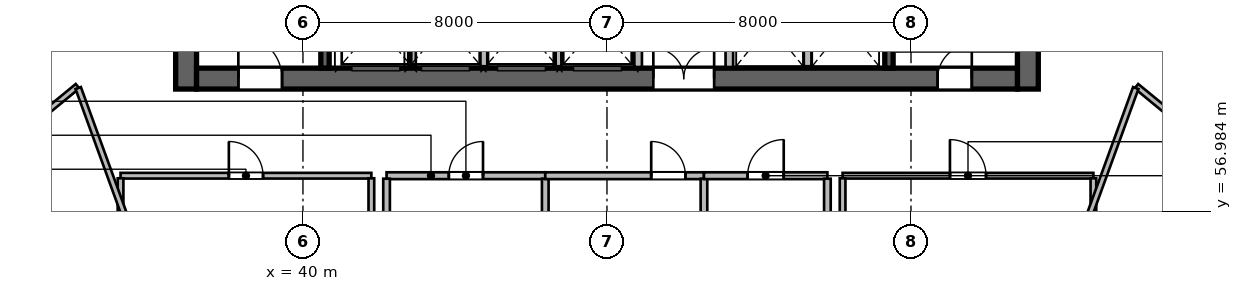
"""IFC4 building model, lengths in metres.
Left out: names, types, materials, properties, quantities, classifications, styles, units other than length and angle.
Written with IfcOpenShell. Run it as: python <this file> out.ifc"""

import sys

from ifc_helpers import new_model, si_unit, direction, frame, frame_2d, origin, place, context, subcontext, project, spatial, rectangle, extrude, source, transform, mapped, element, fill, save


model = new_model("IFC4")
c1 = context("Model", 3, precision=1e-05, world=origin(), true_north=direction((0.0, 1.0)))
c2 = subcontext(c1, "Body", "Model", "MODEL_VIEW")
j1 = project(units=[si_unit("LENGTHUNIT", "METRE"), si_unit("PLANEANGLEUNIT", "RADIAN")], contexts=[c1])
p1 = place(None, origin())
s1 = spatial("IfcSite", under=j1, at=p1, CompositionType="ELEMENT")
p2 = place(p1, origin())
s2 = spatial("IfcBuilding", under=s1, at=p2, CompositionType="ELEMENT")
p3 = place(p2, frame((0.0, 0.0, 53.4)))
s3 = spatial("IfcBuildingStorey", under=s2, at=p3, CompositionType="ELEMENT", Elevation=53.4)
m1 = source(origin(), c2, "Body", "SweptSolid", [
    extrude(rectangle(XDim=12.0, YDim=0.55, at=frame_2d((6.0, 0.0))), origin(), (0.0, 0.0, 1.0), 3.6),
])
for number, where, z_axis, x_axis in (
    (1, (36.925, 60.2, 0.0), (0.0, 0.0, 1.0), (0.0, 1.0, 0.0)),
    (2, (59.075, 60.2, 0.0), (0.0, 0.0, 1.0), (0.0, 1.0, 0.0)),
):
    element("IfcWall", number, at=place(p3, frame(where, z_axis=z_axis, x_axis=x_axis)), inside=s3, PredefinedType="SHEAR", context=c2, shape_type="MappedRepresentation", body=[
        mapped(m1, transform((0.0, 0.0, 0.0), scale=1.0)),
    ])
m2 = source(origin(), c2, "Body", "SweptSolid", [
    extrude(rectangle(XDim=21.6, YDim=0.55, at=frame_2d((10.8, 0.0))), origin(), (0.0, 0.0, 1.0), 3.6),
])
p4 = place(p3, frame((37.2, 60.475, 0.0), z_axis=(0.0, 0.0, 1.0), x_axis=(1.0, 0.0, 0.0)))
e3 = element("IfcWall", 3, at=p4, inside=s3, PredefinedType="SHEAR", context=c2, shape_type="MappedRepresentation", body=[
    mapped(m2, transform((0.0, 0.0, 0.0), scale=1.0)),
])
p5 = place(p4, frame((1.1, 0.0, 0.0)))
e4 = element("IfcOpeningElement", 4, at=p5, cuts=e3, PredefinedType="OPENING", context=c2, shape_type="SweptSolid", body=[
    extrude(rectangle(XDim=1.15, YDim=2.15, at=frame_2d((0.575, 1.075))), frame((0.0, 0.285, 0.0), z_axis=(0.0, -1.0, 0.0), x_axis=(1.0, 0.0, 0.0)), (0.0, 0.0, 1.0), 0.57),
])
p6 = place(p4, frame((19.5, 0.0, 0.0)))
e5 = element("IfcOpeningElement", 5, at=p6, cuts=e3, PredefinedType="OPENING", context=c2, shape_type="SweptSolid", body=[
    extrude(rectangle(XDim=0.9, YDim=2.1, at=frame_2d((0.45, 1.05))), frame((0.0, 0.285, 0.0), z_axis=(0.0, -1.0, 0.0), x_axis=(1.0, 0.0, 0.0)), (0.0, 0.0, 1.0), 0.57),
])
p7 = place(p4, frame((12.02, 0.0, 0.0)))
e6 = element("IfcOpeningElement", 6, at=p7, cuts=e3, PredefinedType="OPENING", context=c2, shape_type="SweptSolid", body=[
    extrude(rectangle(XDim=1.6, YDim=2.15, at=frame_2d((0.8, 1.075))), frame((0.0, 0.285, 0.0), z_axis=(0.0, -1.0, 0.0), x_axis=(1.0, 0.0, 0.0)), (0.0, 0.0, 1.0), 0.57),
])
m3 = source(origin(), c2, "Body", "SweptSolid", [
    extrude(rectangle(XDim=10.9, YDim=0.22, at=frame_2d((5.45, 0.0))), origin(), (0.0, 0.0, 1.0), 3.6),
])
p8 = place(p3, frame((40.58, 60.75, 0.0), z_axis=(0.0, 0.0, 1.0), x_axis=(0.0, 1.0, 0.0)))
e7 = element("IfcWall", 7, at=p8, inside=s3, PredefinedType="SHEAR", context=c2, shape_type="MappedRepresentation", body=[
    mapped(m3, transform((0.0, 0.0, 0.0), scale=1.0)),
])
p9 = place(p3, frame((55.42, 60.75, 0.0), z_axis=(0.0, 0.0, 1.0), x_axis=(0.0, 1.0, 0.0)))
e8 = element("IfcWall", 8, at=p9, inside=s3, PredefinedType="SHEAR", context=c2, shape_type="MappedRepresentation", body=[
    mapped(m3, transform((0.0, 0.0, 0.0), scale=1.0)),
])
p10 = place(p9, frame((9.495, 0.0, 0.0)))
e9 = element("IfcOpeningElement", 9, at=p10, cuts=e8, PredefinedType="OPENING", context=c2, shape_type="SweptSolid", body=[
    extrude(rectangle(XDim=1.15, YDim=2.15, at=frame_2d((0.575, 1.075))), frame((0.0, 0.12, 0.0), z_axis=(0.0, -1.0, 0.0), x_axis=(1.0, 0.0, 0.0)), (0.0, 0.0, 1.0), 0.24),
])
m4 = source(origin(), c2, "Body", "SweptSolid", [
    extrude(rectangle(XDim=2.24, YDim=0.2, at=frame_2d((1.12, 0.0))), origin(), (0.0, 0.0, 1.0), 3.36),
])
for number, where, z_axis, x_axis in (
    (10, (48.82, 60.78, 0.0), (0.0, 0.0, 1.0), (0.0, 1.0, 0.0)),
    (11, (51.22, 60.78, 0.0), (0.0, 0.0, 1.0), (0.0, 1.0, 0.0)),
):
    element("IfcWall", number, at=place(p3, frame(where, z_axis=z_axis, x_axis=x_axis)), inside=s3, PredefinedType="SOLIDWALL", context=c2, shape_type="MappedRepresentation", body=[
        mapped(m4, transform((0.0, 0.0, 0.0), scale=1.0)),
    ])
m5 = source(origin(), c2, "Body", "SweptSolid", [
    extrude(rectangle(XDim=2.2, YDim=0.2, at=frame_2d((1.1, 0.0))), origin(), (0.0, 0.0, 1.0), 3.36),
])
for number, where, z_axis, x_axis in (
    (12, (42.87, 60.8, 0.0), (0.0, 0.0, 1.0), (0.0, 1.0, 0.0)),
    (13, (44.77, 60.8, 0.0), (0.0, 0.0, 1.0), (0.0, 1.0, 0.0)),
    (14, (46.7, 60.8, 0.0), (0.0, 0.0, 1.0), (0.0, 1.0, 0.0)),
    (15, (53.28, 60.8, 0.0), (0.0, 0.0, 1.0), (0.0, 1.0, 0.0)),
):
    element("IfcWall", number, at=place(p3, frame(where, z_axis=z_axis, x_axis=x_axis)), inside=s3, PredefinedType="SOLIDWALL", context=c2, shape_type="MappedRepresentation", body=[
        mapped(m5, transform((0.0, 0.0, 0.0), scale=1.0)),
    ])
m6 = source(origin(), c2, "Body", "SweptSolid", [
    extrude(rectangle(XDim=6.6, YDim=0.15, at=frame_2d((3.3, 0.0))), origin(), (0.0, 0.0, 1.0), 3.36),
])
p11 = place(p3, frame((35.2, 57.92, 0.0), z_axis=(0.0, 0.0, 1.0), x_axis=(1.0, 0.0, 0.0)))
e16 = element("IfcWall", 16, at=p11, inside=s3, PredefinedType="PARTITIONING", context=c2, shape_type="MappedRepresentation", body=[
    mapped(m6, transform((0.0, 0.0, 0.0), scale=1.0)),
])
p12 = place(p11, frame((2.85, 0.0, 0.0)))
e17 = element("IfcOpeningElement", 17, at=p12, cuts=e16, PredefinedType="OPENING", context=c2, shape_type="SweptSolid", body=[
    extrude(rectangle(XDim=0.9, YDim=2.1, at=frame_2d((0.45, 1.05))), frame((0.0, 0.085, 0.0), z_axis=(0.0, -1.0, 0.0), x_axis=(1.0, 0.0, 0.0)), (0.0, 0.0, 1.0), 0.17),
])
m7 = source(origin(), c2, "Body", "SweptSolid", [
    extrude(rectangle(XDim=3.785, YDim=0.15, at=frame_2d((1.893, 0.0))), origin(), (0.0, 0.0, 1.0), 3.36),
])
for number, where, z_axis, x_axis in (
    (18, (35.2, 54.067, 0.0), (0.0, 0.0, 1.0), (0.0, 1.0, 0.0)),
    (19, (41.8, 54.067, 0.0), (0.0, 0.0, 1.0), (0.0, 1.0, 0.0)),
):
    element("IfcWall", number, at=place(p3, frame(where, z_axis=z_axis, x_axis=x_axis)), inside=s3, PredefinedType="PARTITIONING", context=c2, shape_type="MappedRepresentation", body=[
        mapped(m7, transform((0.0, 0.0, 0.0), scale=1.0)),
    ])
m8 = source(origin(), c2, "Body", "SweptSolid", [
    extrude(rectangle(XDim=4.176, YDim=0.18, at=frame_2d((2.088, 0.0))), origin(), (0.0, 0.0, 1.0), 3.36),
])
p13 = place(p3, frame((42.2, 57.92, 0.0), z_axis=(0.0, 0.0, 1.0), x_axis=(1.0, 0.0, 0.0)))
e20 = element("IfcWall", 20, at=p13, inside=s3, PredefinedType="PLUMBINGWALL", context=c2, shape_type="MappedRepresentation", body=[
    mapped(m8, transform((0.0, 0.0, 0.0), scale=1.0)),
])
p14 = place(p13, frame((1.638, 0.0, 0.0)))
e21 = element("IfcOpeningElement", 21, at=p14, cuts=e20, PredefinedType="OPENING", context=c2, shape_type="SweptSolid", body=[
    extrude(rectangle(XDim=0.9, YDim=2.08, at=frame_2d((0.45, 1.04))), frame((0.0, 0.1, 0.0), z_axis=(0.0, -1.0, 0.0), x_axis=(1.0, 0.0, 0.0)), (0.0, 0.0, 1.0), 0.2),
])
m9 = source(origin(), c2, "Body", "SweptSolid", [
    extrude(rectangle(XDim=3.763, YDim=0.175, at=frame_2d((1.881, 0.0))), origin(), (0.0, 0.0, 1.0), 3.36),
])
for number, where, z_axis, x_axis in (
    (22, (42.2, 54.079, 0.0), (0.0, 0.0, 1.0), (0.0, 1.0, 0.0)),
    (23, (46.376, 54.079, 0.0), (0.0, 0.0, 1.0), (0.0, 1.0, 0.0)),
):
    element("IfcWall", number, at=place(p3, frame(where, z_axis=z_axis, x_axis=x_axis)), inside=s3, PredefinedType="PARTITIONING", context=c2, shape_type="MappedRepresentation", body=[
        mapped(m9, transform((0.0, 0.0, 0.0), scale=1.0)),
    ])
p15 = place(p3, frame((46.376, 57.92, 0.0), z_axis=(0.0, 0.0, 1.0), x_axis=(1.0, 0.0, 0.0)))
e24 = element("IfcWall", 24, at=p15, inside=s3, PredefinedType="PLUMBINGWALL", context=c2, shape_type="MappedRepresentation", body=[
    mapped(m8, transform((0.0, 0.0, 0.0), scale=1.0)),
])
p16 = place(p15, frame((2.788, 0.0, 0.0)))
e25 = element("IfcOpeningElement", 25, at=p16, cuts=e24, PredefinedType="OPENING", context=c2, shape_type="SweptSolid", body=[
    extrude(rectangle(XDim=0.9, YDim=2.08, at=frame_2d((0.45, 1.04))), frame((0.0, 0.1, 0.0), z_axis=(0.0, -1.0, 0.0), x_axis=(1.0, 0.0, 0.0)), (0.0, 0.0, 1.0), 0.2),
])
p17 = place(p3, frame((50.552, 54.079, 0.0), z_axis=(0.0, 0.0, 1.0), x_axis=(0.0, 1.0, 0.0)))
e26 = element("IfcWall", 26, at=p17, inside=s3, PredefinedType="PARTITIONING", context=c2, shape_type="MappedRepresentation", body=[
    mapped(m9, transform((0.0, 0.0, 0.0), scale=1.0)),
])
m10 = source(origin(), c2, "Body", "SweptSolid", [
    extrude(rectangle(XDim=3.248, YDim=0.18, at=frame_2d((1.624, 0.0))), origin(), (0.0, 0.0, 1.0), 3.36),
])
p18 = place(p3, frame((50.552, 57.92, 0.0), z_axis=(0.0, 0.0, 1.0), x_axis=(1.0, 0.0, 0.0)))
e27 = element("IfcWall", 27, at=p18, inside=s3, PredefinedType="PLUMBINGWALL", context=c2, shape_type="MappedRepresentation", body=[
    mapped(m10, transform((0.0, 0.0, 0.0), scale=1.0)),
])
p19 = place(p18, frame((1.149, 0.0, 0.0)))
e28 = element("IfcOpeningElement", 28, at=p19, cuts=e27, PredefinedType="OPENING", context=c2, shape_type="SweptSolid", body=[
    extrude(rectangle(XDim=0.95, YDim=2.12, at=frame_2d((0.475, 1.06))), frame((0.0, 0.1, 0.0), z_axis=(0.0, -1.0, 0.0), x_axis=(1.0, 0.0, 0.0)), (0.0, 0.0, 1.0), 0.2),
])
p20 = place(p3, frame((53.8, 54.079, 0.0), z_axis=(0.0, 0.0, 1.0), x_axis=(0.0, 1.0, 0.0)))
e29 = element("IfcWall", 29, at=p20, inside=s3, PredefinedType="PARTITIONING", context=c2, shape_type="MappedRepresentation", body=[
    mapped(m9, transform((0.0, 0.0, 0.0), scale=1.0)),
])
p21 = place(p3, frame((54.2, 57.92, 0.0), z_axis=(0.0, 0.0, 1.0), x_axis=(1.0, 0.0, 0.0)))
e30 = element("IfcWall", 30, at=p21, inside=s3, PredefinedType="PARTITIONING", context=c2, shape_type="MappedRepresentation", body=[
    mapped(m6, transform((0.0, 0.0, 0.0), scale=1.0)),
])
p22 = place(p21, frame((2.825, 0.0, 0.0)))
e31 = element("IfcOpeningElement", 31, at=p22, cuts=e30, PredefinedType="OPENING", context=c2, shape_type="SweptSolid", body=[
    extrude(rectangle(XDim=0.95, YDim=2.1, at=frame_2d((0.475, 1.05))), frame((0.0, 0.085, 0.0), z_axis=(0.0, -1.0, 0.0), x_axis=(1.0, 0.0, 0.0)), (0.0, 0.0, 1.0), 0.17),
])
for number, where, z_axis, x_axis in (
    (32, (54.2, 54.067, 0.0), (0.0, 0.0, 1.0), (0.0, 1.0, 0.0)),
    (33, (60.8, 54.067, 0.0), (0.0, 0.0, 1.0), (0.0, 1.0, 0.0)),
):
    element("IfcWall", number, at=place(p3, frame(where, z_axis=z_axis, x_axis=x_axis)), inside=s3, PredefinedType="PARTITIONING", context=c2, shape_type="MappedRepresentation", body=[
        mapped(m7, transform((0.0, 0.0, 0.0), scale=1.0)),
    ])
m11 = source(origin(), c2, "Body", "SweptSolid", [
    extrude(rectangle(XDim=6.721, YDim=0.15, at=frame_2d((3.361, 0.0))), origin(), (0.0, 0.0, 1.0), 3.36),
])
p23 = place(p3, frame((28.874, 56.01, 0.0), z_axis=(0.0, 0.0, 1.0), x_axis=(0.772828051199, 0.63461547671, 0.0)))
e34 = element("IfcWall", 34, at=p23, inside=s3, PredefinedType="PARTITIONING", context=c2, shape_type="MappedRepresentation", body=[
    mapped(m11, transform((0.0, 0.0, 0.0), scale=1.0)),
])
m12 = source(origin(), c2, "Body", "SweptSolid", [
    extrude(rectangle(XDim=12.196, YDim=0.15, at=frame_2d((6.098, 0.0))), origin(), (0.0, 0.0, 1.0), 3.36),
])
p24 = place(p3, frame((38.258, 48.766, 0.0), z_axis=(0.0, 0.0, 1.0), x_axis=(-0.342022711534, 0.939691686031, 0.0)))
e35 = element("IfcWall", 35, at=p24, inside=s3, PredefinedType="PARTITIONING", context=c2, shape_type="MappedRepresentation", body=[
    mapped(m12, transform((0.0, 0.0, 0.0), scale=1.0)),
])
p25 = place(p3, frame((61.931, 60.275, 0.0), z_axis=(0.0, 0.0, 1.0), x_axis=(0.772828051199, -0.63461547671, 0.0)))
e36 = element("IfcWall", 36, at=p25, inside=s3, PredefinedType="PARTITIONING", context=c2, shape_type="MappedRepresentation", body=[
    mapped(m11, transform((0.0, 0.0, 0.0), scale=1.0)),
])
p26 = place(p25, frame((2.66, 0.0, 0.0)))
e37 = element("IfcOpeningElement", 37, at=p26, cuts=e36, PredefinedType="OPENING", context=c2, shape_type="SweptSolid", body=[
    extrude(rectangle(XDim=1.4, YDim=2.15, at=frame_2d((0.7, 1.075))), frame((0.0, 0.085, 0.0), z_axis=(0.0, -1.0, 0.0), x_axis=(1.0, 0.0, 0.0)), (0.0, 0.0, 1.0), 0.17),
])
p27 = place(p3, frame((57.742, 48.766, 0.0), z_axis=(0.0, 0.0, 1.0), x_axis=(0.342022711534, 0.939691686031, 0.0)))
e38 = element("IfcWall", 38, at=p27, inside=s3, PredefinedType="PARTITIONING", context=c2, shape_type="MappedRepresentation", body=[
    mapped(m12, transform((0.0, 0.0, 0.0), scale=1.0)),
])
m13 = source(origin(), c2, "Body", "SweptSolid", [
    extrude(rectangle(XDim=1.15, YDim=2.15, at=frame_2d((0.575, 1.075))), frame((0.0, 0.025, 0.0), z_axis=(0.0, -1.0, 0.0), x_axis=(1.0, 0.0, 0.0)), (0.0, 0.0, 1.0), 0.05),
])
p28 = place(p5, origin())
e39 = element("IfcDoor", 39, at=p28, inside=s3, OperationType="SINGLE_SWING_LEFT", PredefinedType="DOOR", context=c2, shape_type="MappedRepresentation", body=[
    mapped(m13, transform((0.0, 0.0, 0.0), scale=1.0)),
])
fill(e4, e39)
m14 = source(origin(), c2, "Body", "SweptSolid", [
    extrude(rectangle(XDim=0.9, YDim=2.1, at=frame_2d((0.45, 1.05))), frame((0.0, 0.025, 0.0), z_axis=(0.0, -1.0, 0.0), x_axis=(1.0, 0.0, 0.0)), (0.0, 0.0, 1.0), 0.05),
])
p29 = place(p6, origin())
e40 = element("IfcDoor", 40, at=p29, inside=s3, OperationType="SINGLE_SWING_RIGHT", PredefinedType="DOOR", context=c2, shape_type="MappedRepresentation", body=[
    mapped(m14, transform((0.0, 0.0, 0.0), scale=1.0)),
])
fill(e5, e40)
m15 = source(origin(), c2, "Body", "SweptSolid", [
    extrude(rectangle(XDim=1.6, YDim=2.15, at=frame_2d((0.8, 1.075))), frame((0.0, 0.025, 0.0), z_axis=(0.0, -1.0, 0.0), x_axis=(1.0, 0.0, 0.0)), (0.0, 0.0, 1.0), 0.05),
])
p30 = place(p7, origin())
e41 = element("IfcDoor", 41, at=p30, inside=s3, OperationType="DOUBLE_DOOR_SINGLE_SWING", PredefinedType="DOOR", context=c2, shape_type="MappedRepresentation", body=[
    mapped(m15, transform((0.0, 0.0, 0.0), scale=1.0)),
])
fill(e6, e41)
p31 = place(p12, origin())
e42 = element("IfcDoor", 42, at=p31, inside=s3, OperationType="SINGLE_SWING_LEFT", PredefinedType="DOOR", context=c2, shape_type="MappedRepresentation", body=[
    mapped(m14, transform((0.0, 0.0, 0.0), scale=1.0)),
])
fill(e17, e42)
m16 = source(origin(), c2, "Body", "SweptSolid", [
    extrude(rectangle(XDim=0.9, YDim=2.08, at=frame_2d((0.45, 1.04))), frame((0.0, 0.025, 0.0), z_axis=(0.0, -1.0, 0.0), x_axis=(1.0, 0.0, 0.0)), (0.0, 0.0, 1.0), 0.05),
])
p32 = place(p14, origin())
e43 = element("IfcDoor", 43, at=p32, inside=s3, OperationType="SINGLE_SWING_RIGHT", PredefinedType="DOOR", context=c2, shape_type="MappedRepresentation", body=[
    mapped(m16, transform((0.0, 0.0, 0.0), scale=1.0)),
])
fill(e21, e43)
p33 = place(p16, origin())
e44 = element("IfcDoor", 44, at=p33, inside=s3, OperationType="SINGLE_SWING_LEFT", PredefinedType="DOOR", context=c2, shape_type="MappedRepresentation", body=[
    mapped(m16, transform((0.0, 0.0, 0.0), scale=1.0)),
])
fill(e25, e44)
m17 = source(origin(), c2, "Body", "SweptSolid", [
    extrude(rectangle(XDim=0.95, YDim=2.12, at=frame_2d((0.475, 1.06))), frame((0.0, 0.025, 0.0), z_axis=(0.0, -1.0, 0.0), x_axis=(1.0, 0.0, 0.0)), (0.0, 0.0, 1.0), 0.05),
])
p34 = place(p19, origin())
e45 = element("IfcDoor", 45, at=p34, inside=s3, OperationType="SINGLE_SWING_RIGHT", PredefinedType="DOOR", context=c2, shape_type="MappedRepresentation", body=[
    mapped(m17, transform((0.0, 0.0, 0.0), scale=1.0)),
])
fill(e28, e45)
m18 = source(origin(), c2, "Body", "SweptSolid", [
    extrude(rectangle(XDim=0.95, YDim=2.1, at=frame_2d((0.475, 1.05))), frame((0.0, 0.025, 0.0), z_axis=(0.0, -1.0, 0.0), x_axis=(1.0, 0.0, 0.0)), (0.0, 0.0, 1.0), 0.05),
])
p35 = place(p22, origin())
e46 = element("IfcDoor", 46, at=p35, inside=s3, OperationType="SINGLE_SWING_LEFT", PredefinedType="DOOR", context=c2, shape_type="MappedRepresentation", body=[
    mapped(m18, transform((0.0, 0.0, 0.0), scale=1.0)),
])
fill(e31, e46)
save(model, sys.argv[1])
